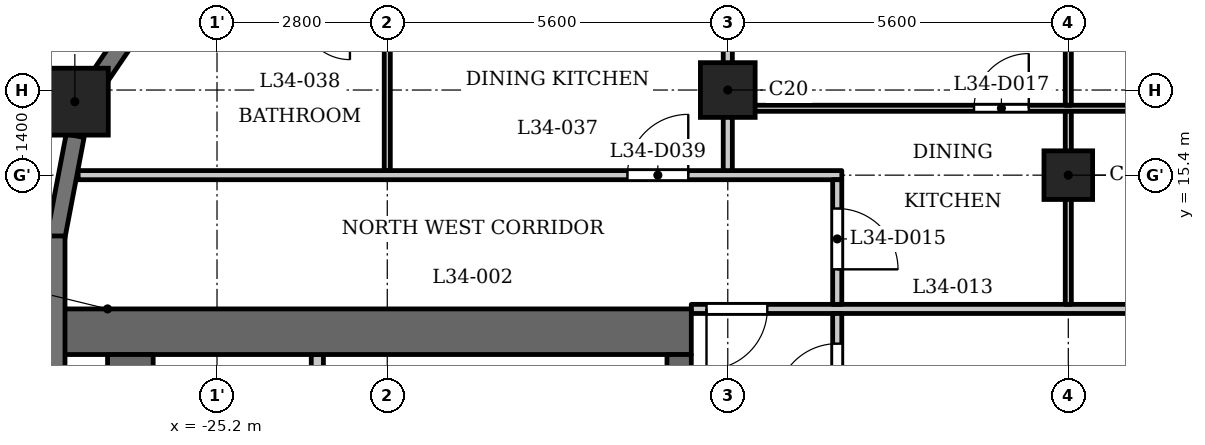
"""IFC4 building model, lengths in metres.
Left out: names, types, materials, properties, quantities, classifications, styles, units other than length and angle.
Written with IfcOpenShell. Run it as: python <this file> out.ifc"""

import sys

from ifc_helpers import new_model, si_unit, direction, frame, frame_2d, origin, origin_2d, place, context, subcontext, project, spatial, rectangle, extrude, element, fill, save


model = new_model("IFC4")
c1 = context("Model", 3, precision=1e-05, world=origin(), true_north=direction((0.0, 1.0)))
c2 = subcontext(c1, "Body", "Model", "MODEL_VIEW")
j1 = project(units=[si_unit("LENGTHUNIT", "METRE"), si_unit("PLANEANGLEUNIT", "RADIAN")], contexts=[c1])
p1 = place(None, origin())
s1 = spatial("IfcSite", under=j1, at=p1, CompositionType="ELEMENT")
p2 = place(p1, origin())
s2 = spatial("IfcBuilding", under=s1, at=p2, CompositionType="ELEMENT")
p3 = place(p2, frame((0.0, 0.0, 136.1)))
s3 = spatial("IfcBuildingStorey", under=s2, at=p3, CompositionType="ELEMENT", Elevation=136.1)
p4 = place(p3, frame((-27.538, 16.609, 0.0), z_axis=(0.0, 0.0, 1.0), x_axis=(1.0, 0.0, 0.0)))
e1 = element("IfcColumn", 1, at=p4, inside=s3, PredefinedType="COLUMN", context=c2, shape_type="SweptSolid", body=[
    extrude(rectangle(XDim=1.1, YDim=1.1, at=origin_2d()), origin(), (0.0, 0.0, 1.0), 3.5),
])
p5 = place(p3, frame((-16.8, 16.8, 0.0), z_axis=(0.0, 0.0, 1.0), x_axis=(1.0, 0.0, 0.0)))
e2 = element("IfcColumn", 2, at=p5, inside=s3, PredefinedType="COLUMN", context=c2, shape_type="SweptSolid", body=[
    extrude(rectangle(XDim=0.9, YDim=0.9, at=origin_2d()), origin(), (0.0, 0.0, 1.0), 3.5),
])
p6 = place(p3, frame((-11.2, 15.4, 0.0), z_axis=(0.0, 0.0, 1.0), x_axis=(1.0, 0.0, 0.0)))
e3 = element("IfcColumn", 3, at=p6, inside=s3, PredefinedType="COLUMN", context=c2, shape_type="SweptSolid", body=[
    extrude(rectangle(XDim=0.8, YDim=0.8, at=origin_2d()), origin(), (0.0, 0.0, 1.0), 3.5),
])
p7 = place(p3, frame((-26.532, 17.893, 0.0), z_axis=(0.0, 0.0, 1.0), x_axis=(-0.562105419172, -0.82706559458, 0.0)))
e4 = element("IfcWall", 4, at=p7, inside=s3, PredefinedType="SOLIDWALL", context=c2, shape_type="SweptSolid", body=[
    extrude(rectangle(XDim=1.077, YDim=0.3, at=frame_2d((0.539, 0.0))), origin(), (0.0, 0.0, 1.0), 3.2),
])
p8 = place(p3, frame((-27.533, 16.048, 0.0), z_axis=(0.0, 0.0, 1.0), x_axis=(-0.187302784601, -0.982302227871, 0.0)))
e5 = element("IfcWall", 5, at=p8, inside=s3, PredefinedType="SOLIDWALL", context=c2, shape_type="SweptSolid", body=[
    extrude(rectangle(XDim=1.706, YDim=0.3, at=frame_2d((0.853, 0.0))), origin(), (0.0, 0.0, 1.0), 2.45),
])
p9 = place(p3, frame((-27.85, 14.4, 0.0), z_axis=(0.0, 0.0, 1.0), x_axis=(0.0, -1.0, 0.0)))
e6 = element("IfcWall", 6, at=p9, inside=s3, PredefinedType="SOLIDWALL", context=c2, shape_type="SweptSolid", body=[
    extrude(rectangle(XDim=2.65, YDim=0.3, at=frame_2d((1.325, 0.0))), origin(), (0.0, 0.0, 1.0), 2.45),
])
p10 = place(p3, frame((-17.4, 12.825, 0.0), z_axis=(0.0, 0.0, 1.0), x_axis=(-1.0, 0.0, 0.0)))
e7 = element("IfcWall", 7, at=p10, inside=s3, PredefinedType="SHEAR", context=c2, shape_type="SweptSolid", body=[
    extrude(rectangle(XDim=10.4, YDim=0.75, at=frame_2d((5.2, 0.0))), origin(), (0.0, 0.0, 1.0), 3.2),
])
p11 = place(p3, frame((-17.6, -12.45, 0.0), z_axis=(0.0, 0.0, 1.0), x_axis=(0.0, 1.0, 0.0)))
e8 = element("IfcWall", 8, at=p11, inside=s3, PredefinedType="SHEAR", context=c2, shape_type="SweptSolid", body=[
    extrude(rectangle(XDim=24.9, YDim=0.4, at=frame_2d((12.45, 0.0))), origin(), (0.0, 0.0, 1.0), 3.2),
])
p12 = place(p11, frame((8.65, 0.0, 0.0)))
e9 = element("IfcOpeningElement", 9, at=p12, cuts=e8, PredefinedType="OPENING", context=c2, shape_type="SweptSolid", body=[
    extrude(rectangle(XDim=0.9, YDim=2.1, at=frame_2d((0.45, 1.05))), frame((0.0, 0.21, 0.0), z_axis=(0.0, -1.0, 0.0), x_axis=(1.0, 0.0, 0.0)), (0.0, 0.0, 1.0), 0.42),
])
p13 = place(p11, frame((15.6, 0.0, 0.0)))
e10 = element("IfcOpeningElement", 10, at=p13, cuts=e8, PredefinedType="OPENING", context=c2, shape_type="SweptSolid", body=[
    extrude(rectangle(XDim=1.1, YDim=2.1, at=frame_2d((0.55, 1.05))), frame((0.0, 0.21, 0.0), z_axis=(0.0, -1.0, 0.0), x_axis=(1.0, 0.0, 0.0)), (0.0, 0.0, 1.0), 0.42),
])
p14 = place(p11, frame((18.0, 0.0, 0.0)))
e11 = element("IfcOpeningElement", 11, at=p14, cuts=e8, PredefinedType="OPENING", context=c2, shape_type="SweptSolid", body=[
    extrude(rectangle(XDim=1.1, YDim=2.1, at=frame_2d((0.55, 1.05))), frame((0.0, 0.21, 0.0), z_axis=(0.0, -1.0, 0.0), x_axis=(1.0, 0.0, 0.0)), (0.0, 0.0, 1.0), 0.42),
])
p15 = place(p11, frame((23.025, 0.0, 0.0)))
e12 = element("IfcOpeningElement", 12, at=p15, cuts=e8, PredefinedType="OPENING", context=c2, shape_type="SweptSolid", body=[
    extrude(rectangle(XDim=1.1, YDim=2.1, at=frame_2d((0.55, 1.05))), frame((0.0, 0.21, 0.0), z_axis=(0.0, -1.0, 0.0), x_axis=(1.0, 0.0, 0.0)), (0.0, 0.0, 1.0), 0.42),
])
p16 = place(p11, frame((0.775, 0.0, 0.0)))
e13 = element("IfcOpeningElement", 13, at=p16, cuts=e8, PredefinedType="OPENING", context=c2, shape_type="SweptSolid", body=[
    extrude(rectangle(XDim=1.1, YDim=2.1, at=frame_2d((0.55, 1.05))), frame((0.0, 0.21, 0.0), z_axis=(0.0, -1.0, 0.0), x_axis=(1.0, 0.0, 0.0)), (0.0, 0.0, 1.0), 0.42),
])
p17 = place(p11, frame((12.925, 0.0, 0.0)))
e14 = element("IfcOpeningElement", 14, at=p17, cuts=e8, PredefinedType="OPENING", context=c2, shape_type="SweptSolid", body=[
    extrude(rectangle(XDim=1.8, YDim=2.1, at=frame_2d((0.9, 1.05))), frame((0.0, 0.21, 0.0), z_axis=(0.0, -1.0, 0.0), x_axis=(1.0, 0.0, 0.0)), (0.0, 0.0, 1.0), 0.42),
])
p18 = place(p3, frame((-26.625, -12.45, 0.0), z_axis=(0.0, 0.0, 1.0), x_axis=(0.0, 1.0, 0.0)))
e15 = element("IfcWall", 15, at=p18, inside=s3, PredefinedType="SHEAR", context=c2, shape_type="SweptSolid", body=[
    extrude(rectangle(XDim=24.9, YDim=0.75, at=frame_2d((12.45, 0.0))), origin(), (0.0, 0.0, 1.0), 3.2),
])
p19 = place(p3, frame((-23.55, 9.8, 0.0), z_axis=(0.0, 0.0, 1.0), x_axis=(0.0, 1.0, 0.0)))
e16 = element("IfcWall", 16, at=p19, inside=s3, PredefinedType="PARTITIONING", context=c2, shape_type="SweptSolid", body=[
    extrude(rectangle(XDim=2.65, YDim=0.2, at=frame_2d((1.325, 0.0))), origin(), (0.0, 0.0, 1.0), 3.2),
])
p20 = place(p19, frame((0.875, 0.0, 0.0)))
e17 = element("IfcOpeningElement", 17, at=p20, cuts=e16, PredefinedType="OPENING", context=c2, shape_type="SweptSolid", body=[
    extrude(rectangle(XDim=0.9, YDim=2.1, at=frame_2d((0.45, 1.05))), frame((0.0, 0.11, 0.0), z_axis=(0.0, -1.0, 0.0), x_axis=(1.0, 0.0, 0.0)), (0.0, 0.0, 1.0), 0.22),
])
p21 = place(p3, frame((-17.4, 13.2, 0.0), z_axis=(0.0, 0.0, 1.0), x_axis=(1.0, 0.0, 0.0)))
e18 = element("IfcWall", 18, at=p21, inside=s3, PredefinedType="PARTITIONING", context=c2, shape_type="SweptSolid", body=[
    extrude(rectangle(XDim=34.8, YDim=0.15, at=frame_2d((17.4, 0.0))), origin(), (0.0, 0.0, 1.0), 3.2),
])
p22 = place(p21, frame((0.25, 0.0, 0.0)))
e19 = element("IfcOpeningElement", 19, at=p22, cuts=e18, PredefinedType="OPENING", context=c2, shape_type="SweptSolid", body=[
    extrude(rectangle(XDim=1.0, YDim=2.1, at=frame_2d((0.5, 1.05))), frame((0.0, 0.085, 0.0), z_axis=(0.0, -1.0, 0.0), x_axis=(1.0, 0.0, 0.0)), (0.0, 0.0, 1.0), 0.17),
])
p23 = place(p21, frame((33.65, 0.0, 0.0)))
e20 = element("IfcOpeningElement", 20, at=p23, cuts=e18, PredefinedType="OPENING", context=c2, shape_type="SweptSolid", body=[
    extrude(rectangle(XDim=1.0, YDim=2.1, at=frame_2d((0.5, 1.05))), frame((0.0, 0.085, 0.0), z_axis=(0.0, -1.0, 0.0), x_axis=(1.0, 0.0, 0.0)), (0.0, 0.0, 1.0), 0.17),
])
p24 = place(p21, frame((15.75, 0.0, 0.0)))
e21 = element("IfcOpeningElement", 21, at=p24, cuts=e18, PredefinedType="OPENING", context=c2, shape_type="SweptSolid", body=[
    extrude(rectangle(XDim=1.0, YDim=2.1, at=frame_2d((0.5, 1.05))), frame((0.0, 0.085, 0.0), z_axis=(0.0, -1.0, 0.0), x_axis=(1.0, 0.0, 0.0)), (0.0, 0.0, 1.0), 0.17),
])
p25 = place(p21, frame((19.35, 0.0, 0.0)))
e22 = element("IfcOpeningElement", 22, at=p25, cuts=e18, PredefinedType="OPENING", context=c2, shape_type="SweptSolid", body=[
    extrude(rectangle(XDim=1.0, YDim=2.1, at=frame_2d((0.5, 1.05))), frame((0.0, 0.085, 0.0), z_axis=(0.0, -1.0, 0.0), x_axis=(1.0, 0.0, 0.0)), (0.0, 0.0, 1.0), 0.17),
])
p26 = place(p21, frame((26.95, 0.0, 0.0)))
e23 = element("IfcOpeningElement", 23, at=p26, cuts=e18, PredefinedType="OPENING", context=c2, shape_type="SweptSolid", body=[
    extrude(rectangle(XDim=1.0, YDim=2.1, at=frame_2d((0.5, 1.05))), frame((0.0, 0.085, 0.0), z_axis=(0.0, -1.0, 0.0), x_axis=(1.0, 0.0, 0.0)), (0.0, 0.0, 1.0), 0.17),
])
p27 = place(p21, frame((29.75, 0.0, 0.0)))
e24 = element("IfcOpeningElement", 24, at=p27, cuts=e18, PredefinedType="OPENING", context=c2, shape_type="SweptSolid", body=[
    extrude(rectangle(XDim=1.0, YDim=2.1, at=frame_2d((0.5, 1.05))), frame((0.0, 0.085, 0.0), z_axis=(0.0, -1.0, 0.0), x_axis=(1.0, 0.0, 0.0)), (0.0, 0.0, 1.0), 0.17),
])
p28 = place(p3, frame((-27.484, 15.4, 0.0), z_axis=(0.0, 0.0, 1.0), x_axis=(1.0, 0.0, 0.0)))
e25 = element("IfcWall", 25, at=p28, inside=s3, PredefinedType="PARTITIONING", context=c2, shape_type="SweptSolid", body=[
    extrude(rectangle(XDim=12.559, YDim=0.15, at=frame_2d((6.279, 0.0))), origin(), (0.0, 0.0, 1.0), 3.2),
])
p29 = place(p28, frame((9.034, 0.0, 0.0)))
e26 = element("IfcOpeningElement", 26, at=p29, cuts=e25, PredefinedType="OPENING", context=c2, shape_type="SweptSolid", body=[
    extrude(rectangle(XDim=1.0, YDim=2.1, at=frame_2d((0.5, 1.05))), frame((0.0, 0.085, 0.0), z_axis=(0.0, -1.0, 0.0), x_axis=(1.0, 0.0, 0.0)), (0.0, 0.0, 1.0), 0.17),
])
p30 = place(p3, frame((-16.725, 16.5, 0.0), z_axis=(0.0, 0.0, 1.0), x_axis=(1.0, 0.0, 0.0)))
e27 = element("IfcWall", 27, at=p30, inside=s3, PredefinedType="PARTITIONING", context=c2, shape_type="SweptSolid", body=[
    extrude(rectangle(XDim=33.45, YDim=0.1, at=frame_2d((16.725, 0.0))), origin(), (0.0, 0.0, 1.0), 3.2),
])
p31 = place(p30, frame((9.675, 0.0, 0.0)))
e28 = element("IfcOpeningElement", 28, at=p31, cuts=e27, PredefinedType="OPENING", context=c2, shape_type="SweptSolid", body=[
    extrude(rectangle(XDim=0.8, YDim=2.1, at=frame_2d((0.4, 1.05))), frame((0.0, 0.06, 0.0), z_axis=(0.0, -1.0, 0.0), x_axis=(1.0, 0.0, 0.0)), (0.0, 0.0, 1.0), 0.12),
])
p32 = place(p30, frame((3.975, 0.0, 0.0)))
e29 = element("IfcOpeningElement", 29, at=p32, cuts=e27, PredefinedType="OPENING", context=c2, shape_type="SweptSolid", body=[
    extrude(rectangle(XDim=0.9, YDim=2.1, at=frame_2d((0.45, 1.05))), frame((0.0, 0.06, 0.0), z_axis=(0.0, -1.0, 0.0), x_axis=(1.0, 0.0, 0.0)), (0.0, 0.0, 1.0), 0.12),
])
p33 = place(p30, frame((12.025, 0.0, 0.0)))
e30 = element("IfcOpeningElement", 30, at=p33, cuts=e27, PredefinedType="OPENING", context=c2, shape_type="SweptSolid", body=[
    extrude(rectangle(XDim=0.8, YDim=2.1, at=frame_2d((0.4, 1.05))), frame((0.0, 0.06, 0.0), z_axis=(0.0, -1.0, 0.0), x_axis=(1.0, 0.0, 0.0)), (0.0, 0.0, 1.0), 0.12),
])
p34 = place(p30, frame((15.175, 0.0, 0.0)))
e31 = element("IfcOpeningElement", 31, at=p34, cuts=e27, PredefinedType="OPENING", context=c2, shape_type="SweptSolid", body=[
    extrude(rectangle(XDim=0.9, YDim=2.1, at=frame_2d((0.45, 1.05))), frame((0.0, 0.06, 0.0), z_axis=(0.0, -1.0, 0.0), x_axis=(1.0, 0.0, 0.0)), (0.0, 0.0, 1.0), 0.12),
])
p35 = place(p30, frame((20.975, 0.0, 0.0)))
e32 = element("IfcOpeningElement", 32, at=p35, cuts=e27, PredefinedType="OPENING", context=c2, shape_type="SweptSolid", body=[
    extrude(rectangle(XDim=0.8, YDim=2.1, at=frame_2d((0.4, 1.05))), frame((0.0, 0.06, 0.0), z_axis=(0.0, -1.0, 0.0), x_axis=(1.0, 0.0, 0.0)), (0.0, 0.0, 1.0), 0.12),
])
p36 = place(p30, frame((18.175, 0.0, 0.0)))
e33 = element("IfcOpeningElement", 33, at=p36, cuts=e27, PredefinedType="OPENING", context=c2, shape_type="SweptSolid", body=[
    extrude(rectangle(XDim=0.9, YDim=2.1, at=frame_2d((0.45, 1.05))), frame((0.0, 0.06, 0.0), z_axis=(0.0, -1.0, 0.0), x_axis=(1.0, 0.0, 0.0)), (0.0, 0.0, 1.0), 0.12),
])
p37 = place(p30, frame((23.725, 0.0, 0.0)))
e34 = element("IfcOpeningElement", 34, at=p37, cuts=e27, PredefinedType="OPENING", context=c2, shape_type="SweptSolid", body=[
    extrude(rectangle(XDim=0.8, YDim=2.1, at=frame_2d((0.4, 1.05))), frame((0.0, 0.06, 0.0), z_axis=(0.0, -1.0, 0.0), x_axis=(1.0, 0.0, 0.0)), (0.0, 0.0, 1.0), 0.12),
])
p38 = place(p30, frame((26.125, 0.0, 0.0)))
e35 = element("IfcOpeningElement", 35, at=p38, cuts=e27, PredefinedType="OPENING", context=c2, shape_type="SweptSolid", body=[
    extrude(rectangle(XDim=0.9, YDim=2.1, at=frame_2d((0.45, 1.05))), frame((0.0, 0.06, 0.0), z_axis=(0.0, -1.0, 0.0), x_axis=(1.0, 0.0, 0.0)), (0.0, 0.0, 1.0), 0.12),
])
p39 = place(p30, frame((32.125, 0.0, 0.0)))
e36 = element("IfcOpeningElement", 36, at=p39, cuts=e27, PredefinedType="OPENING", context=c2, shape_type="SweptSolid", body=[
    extrude(rectangle(XDim=0.8, YDim=2.1, at=frame_2d((0.4, 1.05))), frame((0.0, 0.06, 0.0), z_axis=(0.0, -1.0, 0.0), x_axis=(1.0, 0.0, 0.0)), (0.0, 0.0, 1.0), 0.12),
])
p40 = place(p30, frame((28.975, 0.0, 0.0)))
e37 = element("IfcOpeningElement", 37, at=p40, cuts=e27, PredefinedType="OPENING", context=c2, shape_type="SweptSolid", body=[
    extrude(rectangle(XDim=0.9, YDim=2.1, at=frame_2d((0.45, 1.05))), frame((0.0, 0.06, 0.0), z_axis=(0.0, -1.0, 0.0), x_axis=(1.0, 0.0, 0.0)), (0.0, 0.0, 1.0), 0.12),
])
p41 = place(p3, frame((-22.4, 15.475, 0.0), z_axis=(0.0, 0.0, 1.0), x_axis=(0.0, 1.0, 0.0)))
e38 = element("IfcWall", 38, at=p41, inside=s3, PredefinedType="PARTITIONING", context=c2, shape_type="SweptSolid", body=[
    extrude(rectangle(XDim=2.575, YDim=0.1, at=frame_2d((1.288, 0.0))), origin(), (0.0, 0.0, 1.0), 3.2),
])
p42 = place(p3, frame((-16.8, 15.475, 0.0), z_axis=(0.0, 0.0, 1.0), x_axis=(0.0, 1.0, 0.0)))
e39 = element("IfcWall", 39, at=p42, inside=s3, PredefinedType="PARTITIONING", context=c2, shape_type="SweptSolid", body=[
    extrude(rectangle(XDim=7.455, YDim=0.15, at=frame_2d((3.728, 0.0))), origin(), (0.0, 0.0, 1.0), 3.2),
])
p43 = place(p3, frame((-15.0, 6.769, 0.0), z_axis=(0.0, 0.0, 1.0), x_axis=(0.0, 1.0, 0.0)))
e40 = element("IfcWall", 40, at=p43, inside=s3, PredefinedType="PARTITIONING", context=c2, shape_type="SweptSolid", body=[
    extrude(rectangle(XDim=6.356, YDim=0.15, at=frame_2d((3.178, 0.0))), origin(), (0.0, 0.0, 1.0), 3.2),
])
p44 = place(p43, frame((4.86, 0.0, 0.0)))
e41 = element("IfcOpeningElement", 41, at=p44, cuts=e40, PredefinedType="OPENING", context=c2, shape_type="SweptSolid", body=[
    extrude(rectangle(XDim=1.0, YDim=2.1, at=frame_2d((0.5, 1.05))), frame((0.0, 0.085, 0.0), z_axis=(0.0, -1.0, 0.0), x_axis=(1.0, 0.0, 0.0)), (0.0, 0.0, 1.0), 0.17),
])
p45 = place(p3, frame((-15.0, 13.275, 0.0), z_axis=(0.0, 0.0, 1.0), x_axis=(0.0, 1.0, 0.0)))
e42 = element("IfcWall", 42, at=p45, inside=s3, PredefinedType="PARTITIONING", context=c2, shape_type="SweptSolid", body=[
    extrude(rectangle(XDim=2.05, YDim=0.15, at=frame_2d((1.025, 0.0))), origin(), (0.0, 0.0, 1.0), 3.2),
])
p46 = place(p45, frame((0.576, 0.0, 0.0)))
e43 = element("IfcOpeningElement", 43, at=p46, cuts=e42, PredefinedType="OPENING", context=c2, shape_type="SweptSolid", body=[
    extrude(rectangle(XDim=1.0, YDim=2.1, at=frame_2d((0.5, 1.05))), frame((0.0, 0.085, 0.0), z_axis=(0.0, -1.0, 0.0), x_axis=(1.0, 0.0, 0.0)), (0.0, 0.0, 1.0), 0.17),
])
p47 = place(p3, frame((-11.2, 13.275, 0.0), z_axis=(0.0, 0.0, 1.0), x_axis=(0.0, 1.0, 0.0)))
e44 = element("IfcWall", 44, at=p47, inside=s3, PredefinedType="PARTITIONING", context=c2, shape_type="SweptSolid", body=[
    extrude(rectangle(XDim=3.175, YDim=0.1, at=frame_2d((1.587, 0.0))), origin(), (0.0, 0.0, 1.0), 3.2),
])
p48 = place(p3, frame((-11.2, 16.55, 0.0), z_axis=(0.0, 0.0, 1.0), x_axis=(0.0, 1.0, 0.0)))
e45 = element("IfcWall", 45, at=p48, inside=s3, PredefinedType="PARTITIONING", context=c2, shape_type="SweptSolid", body=[
    extrude(rectangle(XDim=6.38, YDim=0.1, at=frame_2d((3.19, 0.0))), origin(), (0.0, 0.0, 1.0), 3.2),
])
p49 = place(p48, frame((4.1, 0.0, 0.0)))
e46 = element("IfcOpeningElement", 46, at=p49, cuts=e45, PredefinedType="OPENING", context=c2, shape_type="SweptSolid", body=[
    extrude(rectangle(XDim=0.9, YDim=2.1, at=frame_2d((0.45, 1.05))), frame((0.0, 0.06, 0.0), z_axis=(0.0, -1.0, 0.0), x_axis=(1.0, 0.0, 0.0)), (0.0, 0.0, 1.0), 0.12),
])
p50 = place(p44, origin())
e47 = element("IfcDoor", 47, at=p50, inside=s3, OperationType="SINGLE_SWING_RIGHT", PredefinedType="DOOR", context=c2, shape_type="SweptSolid", body=[
    extrude(rectangle(XDim=1.0, YDim=2.1, at=frame_2d((0.5, 1.05))), frame((0.0, 0.025, 0.0), z_axis=(0.0, -1.0, 0.0), x_axis=(1.0, 0.0, 0.0)), (0.0, 0.0, 1.0), 0.05),
])
fill(e41, e47)
p51 = place(p22, origin())
e48 = element("IfcDoor", 48, at=p51, inside=s3, OperationType="SINGLE_SWING_LEFT", PredefinedType="DOOR", context=c2, shape_type="SweptSolid", body=[
    extrude(rectangle(XDim=1.0, YDim=2.1, at=frame_2d((0.5, 1.05))), frame((0.0, 0.025, 0.0), z_axis=(0.0, -1.0, 0.0), x_axis=(1.0, 0.0, 0.0)), (0.0, 0.0, 1.0), 0.05),
])
fill(e19, e48)
p52 = place(p46, origin())
e49 = element("IfcDoor", 49, at=p52, inside=s3, OperationType="SINGLE_SWING_LEFT", PredefinedType="DOOR", context=c2, shape_type="SweptSolid", body=[
    extrude(rectangle(XDim=1.0, YDim=2.1, at=frame_2d((0.5, 1.05))), frame((0.0, 0.025, 0.0), z_axis=(0.0, -1.0, 0.0), x_axis=(1.0, 0.0, 0.0)), (0.0, 0.0, 1.0), 0.05),
])
fill(e43, e49)
p53 = place(p32, origin())
e50 = element("IfcDoor", 50, at=p53, inside=s3, OperationType="SINGLE_SWING_LEFT", PredefinedType="DOOR", context=c2, shape_type="SweptSolid", body=[
    extrude(rectangle(XDim=0.9, YDim=2.1, at=frame_2d((0.45, 1.05))), frame((0.0, 0.025, 0.0), z_axis=(0.0, -1.0, 0.0), x_axis=(1.0, 0.0, 0.0)), (0.0, 0.0, 1.0), 0.05),
])
fill(e29, e50)
p54 = place(p29, origin())
e51 = element("IfcDoor", 51, at=p54, inside=s3, OperationType="SINGLE_SWING_LEFT", PredefinedType="DOOR", context=c2, shape_type="SweptSolid", body=[
    extrude(rectangle(XDim=1.0, YDim=2.1, at=frame_2d((0.5, 1.05))), frame((0.0, 0.025, 0.0), z_axis=(0.0, -1.0, 0.0), x_axis=(1.0, 0.0, 0.0)), (0.0, 0.0, 1.0), 0.05),
])
fill(e26, e51)
save(model, sys.argv[1])
